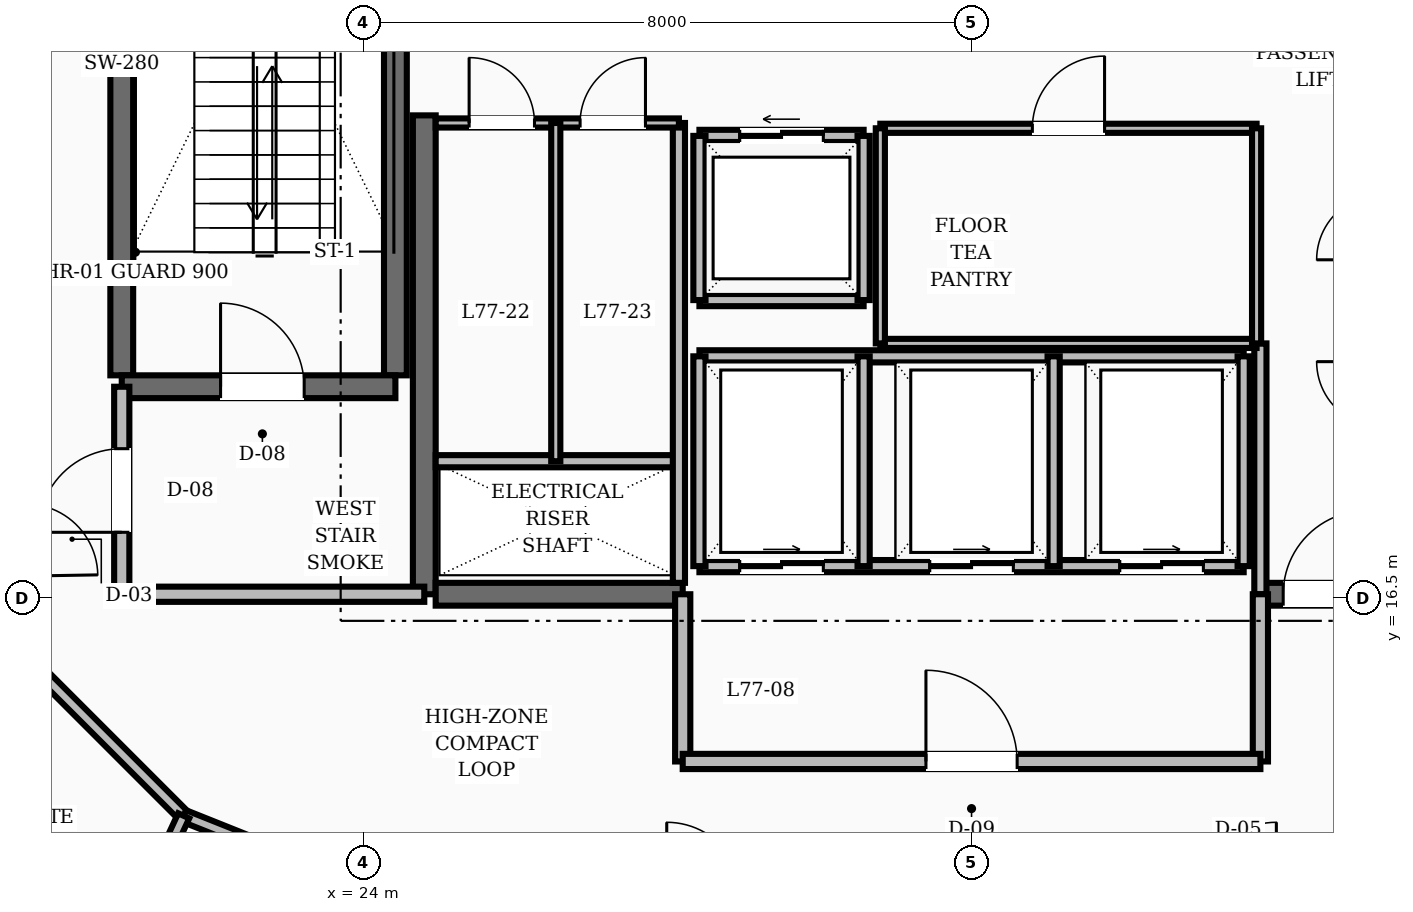
"""IFC4 building model, lengths in metres.
Left out: names, types, materials, properties, quantities, classifications, styles, units other than length and angle.
Written with IfcOpenShell. Run it as: python <this file> out.ifc"""

import sys

from ifc_helpers import new_model, si_unit, direction, frame, frame_2d, origin, place, context, subcontext, project, spatial, rectangle, extrude, element, fill, save


model = new_model("IFC4")
c1 = context("Model", 3, precision=1e-05, world=origin(), true_north=direction((0.0, 1.0)))
c2 = subcontext(c1, "Body", "Model", "MODEL_VIEW")
j1 = project(units=[si_unit("LENGTHUNIT", "METRE"), si_unit("PLANEANGLEUNIT", "RADIAN")], contexts=[c1])
p1 = place(None, origin())
s1 = spatial("IfcSite", under=j1, at=p1, CompositionType="ELEMENT")
p2 = place(p1, origin())
s2 = spatial("IfcBuilding", under=s1, at=p2, CompositionType="ELEMENT")
p3 = place(p2, frame((0.0, 0.0, 294.0)))
s3 = spatial("IfcBuildingStorey", under=s2, at=p3, CompositionType="ELEMENT", Elevation=294.0)
p4 = place(p3, frame((24.8, 16.55, 0.0), z_axis=(0.0, 0.0, 1.0), x_axis=(0.0, 1.0, 0.0)))
e1 = element("IfcWall", 1, at=p4, inside=s3, PredefinedType="SHEAR", context=c2, shape_type="SweptSolid", body=[
    extrude(rectangle(XDim=6.3, YDim=0.3, at=frame_2d((3.15, 0.0))), origin(), (0.0, 0.0, 1.0), 3.6),
])
p5 = place(p3, frame((24.95, 16.55, 0.0), z_axis=(0.0, 0.0, 1.0), x_axis=(1.0, 0.0, 0.0)))
e2 = element("IfcWall", 2, at=p5, inside=s3, PredefinedType="SHEAR", context=c2, shape_type="SweptSolid", body=[
    extrude(rectangle(XDim=3.25, YDim=0.3, at=frame_2d((1.625, 0.0))), origin(), (0.0, 0.0, 1.0), 3.6),
])
p6 = place(p3, frame((35.8, 16.55, 0.0), z_axis=(0.0, 0.0, 1.0), x_axis=(1.0, 0.0, 0.0)))
e3 = element("IfcWall", 3, at=p6, inside=s3, PredefinedType="SHEAR", context=c2, shape_type="SweptSolid", body=[
    extrude(rectangle(XDim=3.25, YDim=0.3, at=frame_2d((1.625, 0.0))), origin(), (0.0, 0.0, 1.0), 3.6),
])
p7 = place(p6, frame((0.3, 0.0, 0.0)))
e4 = element("IfcOpeningElement", 4, at=p7, cuts=e3, PredefinedType="OPENING", context=c2, shape_type="SweptSolid", body=[
    extrude(rectangle(XDim=1.1, YDim=2.1, at=frame_2d((0.55, 1.05))), frame((0.0, 0.16, 0.0), z_axis=(0.0, -1.0, 0.0), x_axis=(1.0, 0.0, 0.0)), (0.0, 0.0, 1.0), 0.32),
])
for number, where, z_axis, x_axis in (
    (5, (20.82, 19.43, 0.0), (0.0, 0.0, 1.0), (0.0, 1.0, 0.0)),
    (6, (24.42, 19.43, 0.0), (0.0, 0.0, 1.0), (0.0, 1.0, 0.0)),
):
    element("IfcWall", number, at=place(p3, frame(where, z_axis=z_axis, x_axis=x_axis)), inside=s3, PredefinedType="SHEAR", context=c2, shape_type="SweptSolid", body=[
        extrude(rectangle(XDim=8.74, YDim=0.3, at=frame_2d((4.37, 0.0))), origin(), (0.0, 0.0, 1.0), 3.6),
    ])
p8 = place(p3, frame((20.82, 19.28, 0.0), z_axis=(0.0, 0.0, 1.0), x_axis=(1.0, 0.0, 0.0)))
e7 = element("IfcWall", 7, at=p8, inside=s3, PredefinedType="SHEAR", context=c2, shape_type="SweptSolid", body=[
    extrude(rectangle(XDim=3.6, YDim=0.3, at=frame_2d((1.8, 0.0))), origin(), (0.0, 0.0, 1.0), 3.6),
])
p9 = place(p8, frame((1.3, 0.0, 0.0)))
e8 = element("IfcOpeningElement", 8, at=p9, cuts=e7, PredefinedType="OPENING", context=c2, shape_type="SweptSolid", body=[
    extrude(rectangle(XDim=1.1, YDim=2.1, at=frame_2d((0.55, 1.05))), frame((0.0, 0.16, 0.0), z_axis=(0.0, -1.0, 0.0), x_axis=(1.0, 0.0, 0.0)), (0.0, 0.0, 1.0), 0.32),
])
p10 = place(p3, frame((20.82, 16.55, 0.0), z_axis=(0.0, 0.0, 1.0), x_axis=(0.0, 1.0, 0.0)))
e9 = element("IfcWall", 9, at=p10, inside=s3, PredefinedType="SOLIDWALL", context=c2, shape_type="SweptSolid", body=[
    extrude(rectangle(XDim=2.73, YDim=0.2, at=frame_2d((1.365, 0.0))), origin(), (0.0, 0.0, 1.0), 2.81),
])
p11 = place(p10, frame((0.815, 0.0, 0.0)))
e10 = element("IfcOpeningElement", 10, at=p11, cuts=e9, PredefinedType="OPENING", context=c2, shape_type="SweptSolid", body=[
    extrude(rectangle(XDim=1.1, YDim=2.1, at=frame_2d((0.55, 1.05))), frame((0.0, 0.11, 0.0), z_axis=(0.0, -1.0, 0.0), x_axis=(1.0, 0.0, 0.0)), (0.0, 0.0, 1.0), 0.22),
])
p12 = place(p3, frame((20.82, 16.55, 0.0), z_axis=(0.0, 0.0, 1.0), x_axis=(1.0, 0.0, 0.0)))
e11 = element("IfcWall", 11, at=p12, inside=s3, PredefinedType="SOLIDWALL", context=c2, shape_type="SweptSolid", body=[
    extrude(rectangle(XDim=3.98, YDim=0.2, at=frame_2d((1.99, 0.0))), origin(), (0.0, 0.0, 1.0), 2.81),
])
p13 = place(p3, frame((35.8, 16.55, 0.0), z_axis=(0.0, 0.0, 1.0), x_axis=(0.0, 1.0, 0.0)))
e12 = element("IfcWall", 12, at=p13, inside=s3, PredefinedType="SOLIDWALL", context=c2, shape_type="SweptSolid", body=[
    extrude(rectangle(XDim=3.3, YDim=0.16, at=frame_2d((1.65, 0.0))), origin(), (0.0, 0.0, 1.0), 2.81),
])
for number, where, z_axis, x_axis in (
    (13, (28.2, 14.35, 0.0), (0.0, 0.0, 1.0), (0.0, 1.0, 0.0)),
    (14, (35.8, 14.35, 0.0), (0.0, 0.0, 1.0), (0.0, 1.0, 0.0)),
):
    element("IfcWall", number, at=place(p3, frame(where, z_axis=z_axis, x_axis=x_axis)), inside=s3, PredefinedType="SOLIDWALL", context=c2, shape_type="SweptSolid", body=[
        extrude(rectangle(XDim=2.2, YDim=0.2, at=frame_2d((1.1, 0.0))), origin(), (0.0, 0.0, 1.0), 2.81),
    ])
p14 = place(p3, frame((28.2, 14.35, 0.0), z_axis=(0.0, 0.0, 1.0), x_axis=(1.0, 0.0, 0.0)))
e15 = element("IfcWall", 15, at=p14, inside=s3, PredefinedType="SOLIDWALL", context=c2, shape_type="SweptSolid", body=[
    extrude(rectangle(XDim=7.6, YDim=0.2, at=frame_2d((3.8, 0.0))), origin(), (0.0, 0.0, 1.0), 2.81),
])
p15 = place(p14, frame((3.2, 0.0, 0.0)))
e16 = element("IfcOpeningElement", 16, at=p15, cuts=e15, PredefinedType="OPENING", context=c2, shape_type="SweptSolid", body=[
    extrude(rectangle(XDim=1.2, YDim=2.1, at=frame_2d((0.6, 1.05))), frame((0.0, 0.11, 0.0), z_axis=(0.0, -1.0, 0.0), x_axis=(1.0, 0.0, 0.0)), (0.0, 0.0, 1.0), 0.22),
])
p16 = place(p3, frame((28.42, 22.58, 0.0), z_axis=(0.0, 0.0, 1.0), x_axis=(1.0, 0.0, 0.0)))
e17 = element("IfcWall", 17, at=p16, inside=s3, PredefinedType="SOLIDWALL", context=c2, shape_type="SweptSolid", body=[
    extrude(rectangle(XDim=2.16, YDim=0.16, at=frame_2d((1.08, 0.0))), origin(), (0.0, 0.0, 1.0), 2.81),
])
p17 = place(p16, frame((0.53, 0.0, 0.0)))
e18 = element("IfcOpeningElement", 18, at=p17, cuts=e17, PredefinedType="OPENING", context=c2, shape_type="SweptSolid", body=[
    extrude(rectangle(XDim=1.1, YDim=2.15, at=frame_2d((0.55, 1.075))), frame((0.0, 0.09, 0.0), z_axis=(0.0, -1.0, 0.0), x_axis=(1.0, 0.0, 0.0)), (0.0, 0.0, 1.0), 0.18),
])
for number, where, z_axis, x_axis in (
    (19, (28.42, 20.42, 0.0), (0.0, 0.0, 1.0), (1.0, 0.0, 0.0)),
    (20, (28.42, 20.42, 0.0), (0.0, 0.0, 1.0), (0.0, 1.0, 0.0)),
    (21, (30.58, 20.42, 0.0), (0.0, 0.0, 1.0), (0.0, 1.0, 0.0)),
):
    element("IfcWall", number, at=place(p3, frame(where, z_axis=z_axis, x_axis=x_axis)), inside=s3, PredefinedType="SOLIDWALL", context=c2, shape_type="SweptSolid", body=[
        extrude(rectangle(XDim=2.16, YDim=0.16, at=frame_2d((1.08, 0.0))), origin(), (0.0, 0.0, 1.0), 2.81),
    ])
p18 = place(p3, frame((28.42, 16.92, 0.0), z_axis=(0.0, 0.0, 1.0), x_axis=(1.0, 0.0, 0.0)))
e22 = element("IfcWall", 22, at=p18, inside=s3, PredefinedType="SOLIDWALL", context=c2, shape_type="SweptSolid", body=[
    extrude(rectangle(XDim=7.16, YDim=0.16, at=frame_2d((3.58, 0.0))), origin(), (0.0, 0.0, 1.0), 2.81),
])
p19 = place(p18, frame((0.53, 0.0, 0.0)))
e23 = element("IfcOpeningElement", 23, at=p19, cuts=e22, PredefinedType="OPENING", context=c2, shape_type="SweptSolid", body=[
    extrude(rectangle(XDim=1.1, YDim=2.15, at=frame_2d((0.55, 1.075))), frame((0.0, 0.09, 0.0), z_axis=(0.0, -1.0, 0.0), x_axis=(1.0, 0.0, 0.0)), (0.0, 0.0, 1.0), 0.18),
])
p20 = place(p18, frame((3.03, 0.0, 0.0)))
e24 = element("IfcOpeningElement", 24, at=p20, cuts=e22, PredefinedType="OPENING", context=c2, shape_type="SweptSolid", body=[
    extrude(rectangle(XDim=1.1, YDim=2.15, at=frame_2d((0.55, 1.075))), frame((0.0, 0.09, 0.0), z_axis=(0.0, -1.0, 0.0), x_axis=(1.0, 0.0, 0.0)), (0.0, 0.0, 1.0), 0.18),
])
p21 = place(p18, frame((5.53, 0.0, 0.0)))
e25 = element("IfcOpeningElement", 25, at=p21, cuts=e22, PredefinedType="OPENING", context=c2, shape_type="SweptSolid", body=[
    extrude(rectangle(XDim=1.1, YDim=2.15, at=frame_2d((0.55, 1.075))), frame((0.0, 0.09, 0.0), z_axis=(0.0, -1.0, 0.0), x_axis=(1.0, 0.0, 0.0)), (0.0, 0.0, 1.0), 0.18),
])
p22 = place(p3, frame((28.42, 19.68, 0.0), z_axis=(0.0, 0.0, 1.0), x_axis=(1.0, 0.0, 0.0)))
e26 = element("IfcWall", 26, at=p22, inside=s3, PredefinedType="SOLIDWALL", context=c2, shape_type="SweptSolid", body=[
    extrude(rectangle(XDim=7.16, YDim=0.16, at=frame_2d((3.58, 0.0))), origin(), (0.0, 0.0, 1.0), 2.81),
])
for number, where, z_axis, x_axis in (
    (27, (28.42, 16.92, 0.0), (0.0, 0.0, 1.0), (0.0, 1.0, 0.0)),
    (28, (30.58, 16.92, 0.0), (0.0, 0.0, 1.0), (0.0, 1.0, 0.0)),
    (29, (33.08, 16.92, 0.0), (0.0, 0.0, 1.0), (0.0, 1.0, 0.0)),
    (30, (35.58, 16.92, 0.0), (0.0, 0.0, 1.0), (0.0, 1.0, 0.0)),
):
    element("IfcWall", number, at=place(p3, frame(where, z_axis=z_axis, x_axis=x_axis)), inside=s3, PredefinedType="SOLIDWALL", context=c2, shape_type="SweptSolid", body=[
        extrude(rectangle(XDim=2.76, YDim=0.16, at=frame_2d((1.38, 0.0))), origin(), (0.0, 0.0, 1.0), 2.81),
    ])
p23 = place(p3, frame((30.8, 22.68, 0.0), z_axis=(0.0, 0.0, 1.0), x_axis=(1.0, 0.0, 0.0)))
e31 = element("IfcWall", 31, at=p23, inside=s3, PredefinedType="PARTITIONING", context=c2, shape_type="SweptSolid", body=[
    extrude(rectangle(XDim=4.95, YDim=0.12, at=frame_2d((2.475, 0.0))), origin(), (0.0, 0.0, 1.0), 2.81),
])
p24 = place(p23, frame((2.0, 0.0, 0.0)))
e32 = element("IfcOpeningElement", 32, at=p24, cuts=e31, PredefinedType="OPENING", context=c2, shape_type="SweptSolid", body=[
    extrude(rectangle(XDim=0.95, YDim=2.1, at=frame_2d((0.475, 1.05))), frame((0.0, 0.07, 0.0), z_axis=(0.0, -1.0, 0.0), x_axis=(1.0, 0.0, 0.0)), (0.0, 0.0, 1.0), 0.14),
])
p25 = place(p3, frame((30.8, 19.85, 0.0), z_axis=(0.0, 0.0, 1.0), x_axis=(1.0, 0.0, 0.0)))
e33 = element("IfcWall", 33, at=p25, inside=s3, PredefinedType="PARTITIONING", context=c2, shape_type="SweptSolid", body=[
    extrude(rectangle(XDim=4.95, YDim=0.12, at=frame_2d((2.475, 0.0))), origin(), (0.0, 0.0, 1.0), 2.81),
])
for number, where, z_axis, x_axis in (
    (34, (30.8, 19.85, 0.0), (0.0, 0.0, 1.0), (0.0, 1.0, 0.0)),
    (35, (35.75, 19.85, 0.0), (0.0, 0.0, 1.0), (0.0, 1.0, 0.0)),
):
    element("IfcWall", number, at=place(p3, frame(where, z_axis=z_axis, x_axis=x_axis)), inside=s3, PredefinedType="PARTITIONING", context=c2, shape_type="SweptSolid", body=[
        extrude(rectangle(XDim=2.83, YDim=0.12, at=frame_2d((1.415, 0.0))), origin(), (0.0, 0.0, 1.0), 2.81),
    ])
p26 = place(p3, frame((24.95, 18.3, 0.0), z_axis=(0.0, 0.0, 1.0), x_axis=(1.0, 0.0, 0.0)))
e36 = element("IfcWall", 36, at=p26, inside=s3, PredefinedType="SOLIDWALL", context=c2, shape_type="SweptSolid", body=[
    extrude(rectangle(XDim=3.2, YDim=0.16, at=frame_2d((1.6, 0.0))), origin(), (0.0, 0.0, 1.0), 2.81),
])
p27 = place(p3, frame((28.15, 16.7, 0.0), z_axis=(0.0, 0.0, 1.0), x_axis=(0.0, 1.0, 0.0)))
e37 = element("IfcWall", 37, at=p27, inside=s3, PredefinedType="SOLIDWALL", context=c2, shape_type="SweptSolid", body=[
    extrude(rectangle(XDim=6.05, YDim=0.16, at=frame_2d((3.025, 0.0))), origin(), (0.0, 0.0, 1.0), 2.81),
])
p28 = place(p3, frame((24.95, 22.75, 0.0), z_axis=(0.0, 0.0, 1.0), x_axis=(1.0, 0.0, 0.0)))
e38 = element("IfcWall", 38, at=p28, inside=s3, PredefinedType="PARTITIONING", context=c2, shape_type="SweptSolid", body=[
    extrude(rectangle(XDim=3.2, YDim=0.12, at=frame_2d((1.6, 0.0))), origin(), (0.0, 0.0, 1.0), 2.81),
])
p29 = place(p28, frame((0.44, 0.0, 0.0)))
e39 = element("IfcOpeningElement", 39, at=p29, cuts=e38, PredefinedType="OPENING", context=c2, shape_type="SweptSolid", body=[
    extrude(rectangle(XDim=0.86, YDim=2.1, at=frame_2d((0.43, 1.05))), frame((0.0, 0.07, 0.0), z_axis=(0.0, -1.0, 0.0), x_axis=(1.0, 0.0, 0.0)), (0.0, 0.0, 1.0), 0.14),
])
p30 = place(p28, frame((1.9, 0.0, 0.0)))
e40 = element("IfcOpeningElement", 40, at=p30, cuts=e38, PredefinedType="OPENING", context=c2, shape_type="SweptSolid", body=[
    extrude(rectangle(XDim=0.86, YDim=2.1, at=frame_2d((0.43, 1.05))), frame((0.0, 0.07, 0.0), z_axis=(0.0, -1.0, 0.0), x_axis=(1.0, 0.0, 0.0)), (0.0, 0.0, 1.0), 0.14),
])
p31 = place(p3, frame((26.53, 18.3, 0.0), z_axis=(0.0, 0.0, 1.0), x_axis=(0.0, 1.0, 0.0)))
e41 = element("IfcWall", 41, at=p31, inside=s3, PredefinedType="PARTITIONING", context=c2, shape_type="SweptSolid", body=[
    extrude(rectangle(XDim=4.45, YDim=0.12, at=frame_2d((2.225, 0.0))), origin(), (0.0, 0.0, 1.0), 2.81),
])
p32 = place(p3, frame((19.573, 15.697, 0.0), z_axis=(0.0, 0.0, 1.0), x_axis=(0.707106781187, -0.707106781187, 0.0)))
e42 = element("IfcWall", 42, at=p32, inside=s3, PredefinedType="SOLIDWALL", context=c2, shape_type="SweptSolid", body=[
    extrude(rectangle(XDim=2.916, YDim=0.16, at=frame_2d((1.458, 0.0))), origin(), (0.0, 0.0, 1.0), 2.81),
])
p33 = place(p3, frame((21.635, 13.635, 0.0), z_axis=(0.0, 0.0, 1.0), x_axis=(0.92856882165, -0.371160266542, 0.0)))
e43 = element("IfcWall", 43, at=p33, inside=s3, PredefinedType="SOLIDWALL", context=c2, shape_type="SweptSolid", body=[
    extrude(rectangle(XDim=2.923, YDim=0.16, at=frame_2d((1.461, 0.0))), origin(), (0.0, 0.0, 1.0), 2.81),
])
p34 = place(p3, frame((21.635, 13.635, 0.0), z_axis=(0.0, 0.0, 1.0), x_axis=(-0.420569037513, -0.907260538481, 0.0)))
e44 = element("IfcWall", 44, at=p34, inside=s3, PredefinedType="SOLIDWALL", context=c2, shape_type="SweptSolid", body=[
    extrude(rectangle(XDim=4.855, YDim=0.16, at=frame_2d((2.428, 0.0))), origin(), (0.0, 0.0, 1.0), 2.81),
])
p35 = place(p9, origin())
e45 = element("IfcDoor", 45, at=p35, inside=s3, OperationType="SINGLE_SWING_LEFT", PredefinedType="DOOR", context=c2, shape_type="SweptSolid", body=[
    extrude(rectangle(XDim=1.1, YDim=2.1, at=frame_2d((0.55, 1.05))), frame((0.0, 0.025, 0.0), z_axis=(0.0, -1.0, 0.0), x_axis=(1.0, 0.0, 0.0)), (0.0, 0.0, 1.0), 0.05),
])
fill(e8, e45)
p36 = place(p11, origin())
e46 = element("IfcDoor", 46, at=p36, inside=s3, OperationType="SINGLE_SWING_LEFT", PredefinedType="DOOR", context=c2, shape_type="SweptSolid", body=[
    extrude(rectangle(XDim=1.1, YDim=2.1, at=frame_2d((0.55, 1.05))), frame((0.0, 0.025, 0.0), z_axis=(0.0, -1.0, 0.0), x_axis=(1.0, 0.0, 0.0)), (0.0, 0.0, 1.0), 0.05),
])
fill(e10, e46)
p37 = place(p7, origin())
e47 = element("IfcDoor", 47, at=p37, inside=s3, OperationType="SINGLE_SWING_RIGHT", PredefinedType="DOOR", context=c2, shape_type="SweptSolid", body=[
    extrude(rectangle(XDim=1.1, YDim=2.1, at=frame_2d((0.55, 1.05))), frame((0.0, 0.025, 0.0), z_axis=(0.0, -1.0, 0.0), x_axis=(1.0, 0.0, 0.0)), (0.0, 0.0, 1.0), 0.05),
])
fill(e4, e47)
p38 = place(p15, origin())
e48 = element("IfcDoor", 48, at=p38, inside=s3, OperationType="SINGLE_SWING_LEFT", PredefinedType="DOOR", context=c2, shape_type="SweptSolid", body=[
    extrude(rectangle(XDim=1.2, YDim=2.1, at=frame_2d((0.6, 1.05))), frame((0.0, 0.025, 0.0), z_axis=(0.0, -1.0, 0.0), x_axis=(1.0, 0.0, 0.0)), (0.0, 0.0, 1.0), 0.05),
])
fill(e16, e48)
p39 = place(p17, origin())
e49 = element("IfcDoor", 49, at=p39, inside=s3, OperationType="SLIDING_TO_LEFT", PredefinedType="DOOR", context=c2, shape_type="SweptSolid", body=[
    extrude(rectangle(XDim=1.1, YDim=2.15, at=frame_2d((0.55, 1.075))), frame((0.0, 0.025, 0.0), z_axis=(0.0, -1.0, 0.0), x_axis=(1.0, 0.0, 0.0)), (0.0, 0.0, 1.0), 0.05),
])
fill(e18, e49)
p40 = place(p19, origin())
e50 = element("IfcDoor", 50, at=p40, inside=s3, OperationType="SLIDING_TO_RIGHT", PredefinedType="DOOR", context=c2, shape_type="SweptSolid", body=[
    extrude(rectangle(XDim=1.1, YDim=2.15, at=frame_2d((0.55, 1.075))), frame((0.0, 0.025, 0.0), z_axis=(0.0, -1.0, 0.0), x_axis=(1.0, 0.0, 0.0)), (0.0, 0.0, 1.0), 0.05),
])
fill(e23, e50)
p41 = place(p20, origin())
e51 = element("IfcDoor", 51, at=p41, inside=s3, OperationType="SLIDING_TO_RIGHT", PredefinedType="DOOR", context=c2, shape_type="SweptSolid", body=[
    extrude(rectangle(XDim=1.1, YDim=2.15, at=frame_2d((0.55, 1.075))), frame((0.0, 0.025, 0.0), z_axis=(0.0, -1.0, 0.0), x_axis=(1.0, 0.0, 0.0)), (0.0, 0.0, 1.0), 0.05),
])
fill(e24, e51)
p42 = place(p21, origin())
e52 = element("IfcDoor", 52, at=p42, inside=s3, OperationType="SLIDING_TO_RIGHT", PredefinedType="DOOR", context=c2, shape_type="SweptSolid", body=[
    extrude(rectangle(XDim=1.1, YDim=2.15, at=frame_2d((0.55, 1.075))), frame((0.0, 0.025, 0.0), z_axis=(0.0, -1.0, 0.0), x_axis=(1.0, 0.0, 0.0)), (0.0, 0.0, 1.0), 0.05),
])
fill(e25, e52)
p43 = place(p24, origin())
e53 = element("IfcDoor", 53, at=p43, inside=s3, OperationType="SINGLE_SWING_RIGHT", PredefinedType="DOOR", context=c2, shape_type="SweptSolid", body=[
    extrude(rectangle(XDim=0.95, YDim=2.1, at=frame_2d((0.475, 1.05))), frame((0.0, 0.025, 0.0), z_axis=(0.0, -1.0, 0.0), x_axis=(1.0, 0.0, 0.0)), (0.0, 0.0, 1.0), 0.05),
])
fill(e32, e53)
p44 = place(p29, origin())
e54 = element("IfcDoor", 54, at=p44, inside=s3, OperationType="SINGLE_SWING_LEFT", PredefinedType="DOOR", context=c2, shape_type="SweptSolid", body=[
    extrude(rectangle(XDim=0.86, YDim=2.1, at=frame_2d((0.43, 1.05))), frame((0.0, 0.025, 0.0), z_axis=(0.0, -1.0, 0.0), x_axis=(1.0, 0.0, 0.0)), (0.0, 0.0, 1.0), 0.05),
])
fill(e39, e54)
p45 = place(p30, origin())
e55 = element("IfcDoor", 55, at=p45, inside=s3, OperationType="SINGLE_SWING_RIGHT", PredefinedType="DOOR", context=c2, shape_type="SweptSolid", body=[
    extrude(rectangle(XDim=0.86, YDim=2.1, at=frame_2d((0.43, 1.05))), frame((0.0, 0.025, 0.0), z_axis=(0.0, -1.0, 0.0), x_axis=(1.0, 0.0, 0.0)), (0.0, 0.0, 1.0), 0.05),
])
fill(e40, e55)
save(model, sys.argv[1])
